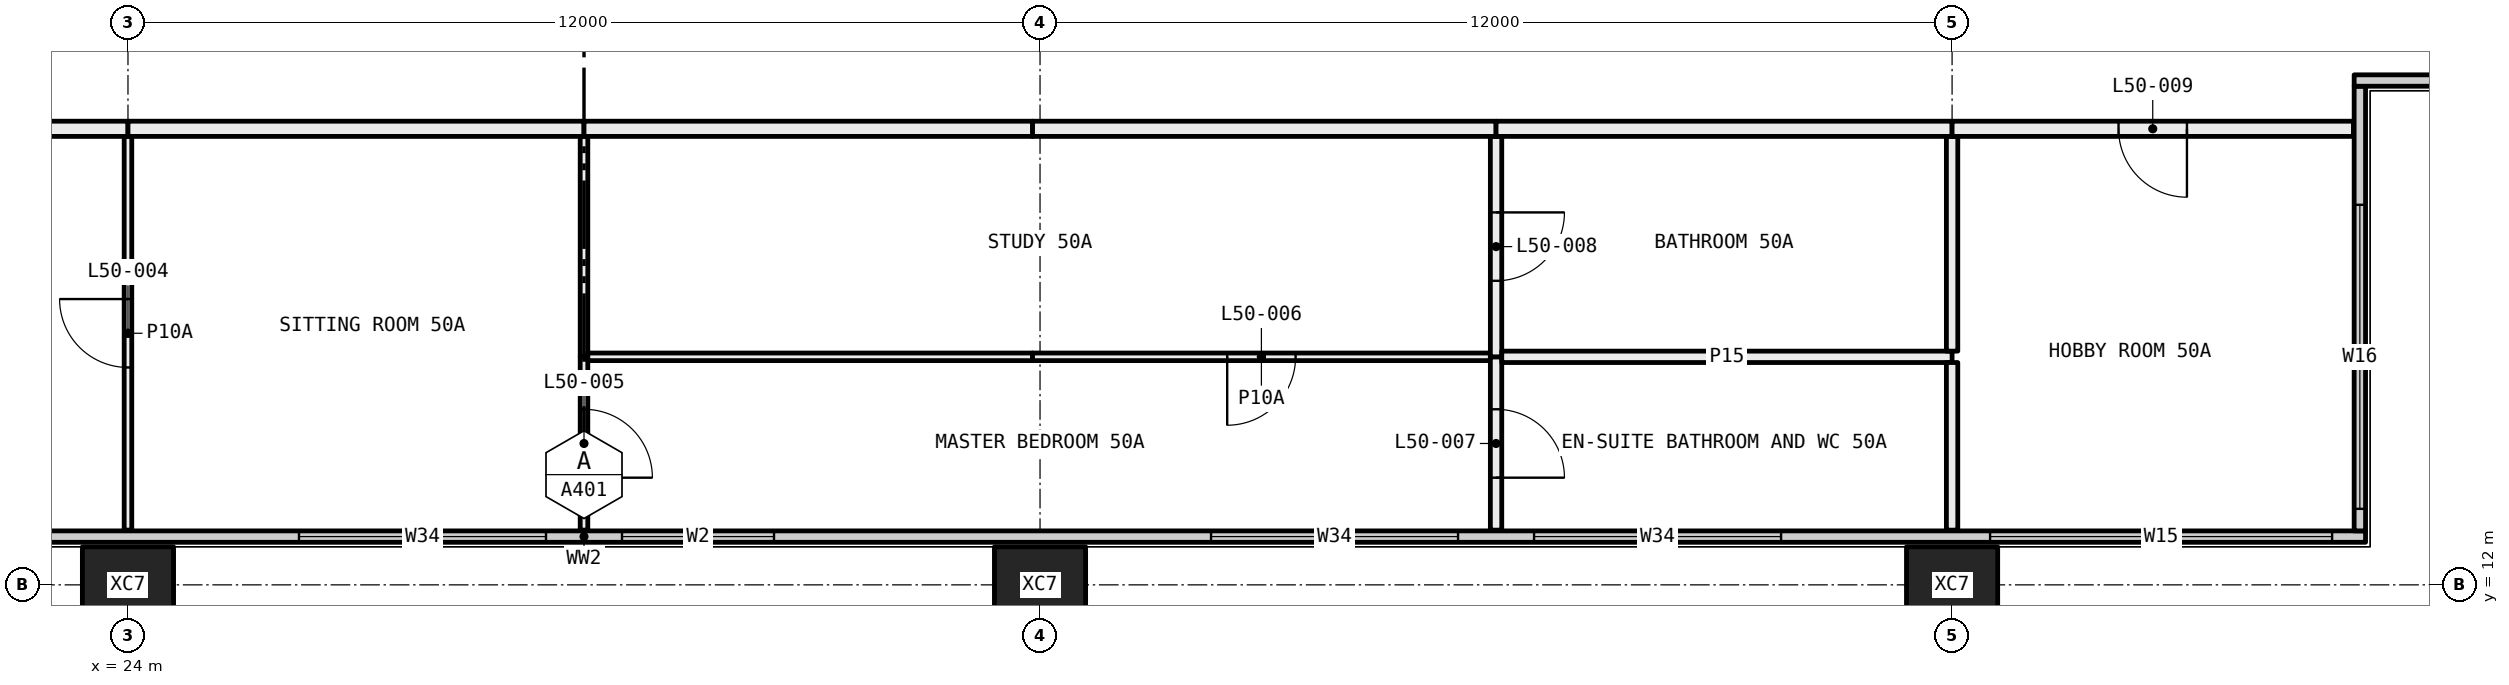
"""IFC4 building model, lengths in metres.
Left out: names, types, materials, properties, quantities, classifications, styles, units other than length and angle.
Written with IfcOpenShell. Run it as: python <this file> out.ifc"""

import sys

from ifc_helpers import new_model, si_unit, direction, frame, frame_2d, origin, origin_2d, place, context, subcontext, project, spatial, rectangle, hollow_rectangle, extrude, element, fill, save


model = new_model("IFC4")
c1 = context("Model", 3, precision=1e-05, world=origin(), true_north=direction((0.0, 1.0)))
c2 = subcontext(c1, "Body", "Model", "MODEL_VIEW")
j1 = project(units=[si_unit("LENGTHUNIT", "METRE"), si_unit("PLANEANGLEUNIT", "RADIAN")], contexts=[c1])
p1 = place(None, origin())
s1 = spatial("IfcSite", under=j1, at=p1, CompositionType="ELEMENT")
p2 = place(p1, origin())
s2 = spatial("IfcBuilding", under=s1, at=p2, CompositionType="ELEMENT")
p3 = place(p2, frame((0.0, 0.0, 189.3)))
s3 = spatial("IfcBuildingStorey", under=s2, at=p3, CompositionType="ELEMENT", Elevation=189.3)
for number, where, z_axis, x_axis in (
    (1, (24.0, 12.0, -0.4), (0.0, 0.0, 1.0), (1.0, 0.0, 0.0)),
    (2, (36.0, 12.0, -0.4), (0.0, 0.0, 1.0), (1.0, 0.0, 0.0)),
    (3, (48.0, 12.0, -0.4), (0.0, 0.0, 1.0), (1.0, 0.0, 0.0)),
):
    element("IfcColumn", number, at=place(p3, frame(where, z_axis=z_axis, x_axis=x_axis)), inside=s3, PredefinedType="COLUMN", context=c2, shape_type="SweptSolid", body=[
        extrude(hollow_rectangle(XDim=1.2, YDim=1.0, WallThickness=0.045, at=origin_2d()), origin(), (0.0, 0.0, 1.0), 3.45),
    ])
p4 = place(p3, frame((6.56, 12.635, 0.0), z_axis=(0.0, 0.0, 1.0), x_axis=(1.0, 0.0, 0.0)))
e4 = element("IfcWall", 4, at=p4, inside=s3, PredefinedType="ELEMENTEDWALL", context=c2, shape_type="SweptSolid", body=[
    extrude(rectangle(XDim=46.88, YDim=0.15, at=frame_2d((23.44, 0.0))), origin(), (0.0, 0.0, 1.0), 3.05),
])
p5 = place(p4, frame((0.44, 0.0, 0.45)))
e5 = element("IfcOpeningElement", 5, at=p5, cuts=e4, PredefinedType="OPENING", context=c2, shape_type="SweptSolid", body=[
    extrude(rectangle(XDim=4.5, YDim=2.55, at=frame_2d((2.25, 1.275))), frame((0.0, 0.085, 0.0), z_axis=(0.0, -1.0, 0.0), x_axis=(1.0, 0.0, 0.0)), (0.0, 0.0, 1.0), 0.17),
])
p6 = place(p4, frame((7.69, 0.0, 0.45)))
e6 = element("IfcOpeningElement", 6, at=p6, cuts=e4, PredefinedType="OPENING", context=c2, shape_type="SweptSolid", body=[
    extrude(rectangle(XDim=3.25, YDim=2.55, at=frame_2d((1.625, 1.275))), frame((0.0, 0.085, 0.0), z_axis=(0.0, -1.0, 0.0), x_axis=(1.0, 0.0, 0.0)), (0.0, 0.0, 1.0), 0.17),
])
p7 = place(p4, frame((11.94, 0.0, 0.45)))
e7 = element("IfcOpeningElement", 7, at=p7, cuts=e4, PredefinedType="OPENING", context=c2, shape_type="SweptSolid", body=[
    extrude(rectangle(XDim=3.25, YDim=2.55, at=frame_2d((1.625, 1.275))), frame((0.0, 0.085, 0.0), z_axis=(0.0, -1.0, 0.0), x_axis=(1.0, 0.0, 0.0)), (0.0, 0.0, 1.0), 0.17),
])
p8 = place(p4, frame((19.69, 0.0, 0.45)))
e8 = element("IfcOpeningElement", 8, at=p8, cuts=e4, PredefinedType="OPENING", context=c2, shape_type="SweptSolid", body=[
    extrude(rectangle(XDim=3.25, YDim=2.55, at=frame_2d((1.625, 1.275))), frame((0.0, 0.085, 0.0), z_axis=(0.0, -1.0, 0.0), x_axis=(1.0, 0.0, 0.0)), (0.0, 0.0, 1.0), 0.17),
])
p9 = place(p4, frame((23.94, 0.0, 0.45)))
e9 = element("IfcOpeningElement", 9, at=p9, cuts=e4, PredefinedType="OPENING", context=c2, shape_type="SweptSolid", body=[
    extrude(rectangle(XDim=2.0, YDim=2.55, at=frame_2d((1.0, 1.275))), frame((0.0, 0.085, 0.0), z_axis=(0.0, -1.0, 0.0), x_axis=(1.0, 0.0, 0.0)), (0.0, 0.0, 1.0), 0.17),
])
p10 = place(p4, frame((31.69, 0.0, 0.45)))
e10 = element("IfcOpeningElement", 10, at=p10, cuts=e4, PredefinedType="OPENING", context=c2, shape_type="SweptSolid", body=[
    extrude(rectangle(XDim=3.25, YDim=2.55, at=frame_2d((1.625, 1.275))), frame((0.0, 0.085, 0.0), z_axis=(0.0, -1.0, 0.0), x_axis=(1.0, 0.0, 0.0)), (0.0, 0.0, 1.0), 0.17),
])
p11 = place(p4, frame((35.94, 0.0, 0.45)))
e11 = element("IfcOpeningElement", 11, at=p11, cuts=e4, PredefinedType="OPENING", context=c2, shape_type="SweptSolid", body=[
    extrude(rectangle(XDim=3.25, YDim=2.55, at=frame_2d((1.625, 1.275))), frame((0.0, 0.085, 0.0), z_axis=(0.0, -1.0, 0.0), x_axis=(1.0, 0.0, 0.0)), (0.0, 0.0, 1.0), 0.17),
])
p12 = place(p4, frame((41.94, 0.0, 0.45)))
e12 = element("IfcOpeningElement", 12, at=p12, cuts=e4, PredefinedType="OPENING", context=c2, shape_type="SweptSolid", body=[
    extrude(rectangle(XDim=4.5, YDim=2.55, at=frame_2d((2.25, 1.275))), frame((0.0, 0.085, 0.0), z_axis=(0.0, -1.0, 0.0), x_axis=(1.0, 0.0, 0.0)), (0.0, 0.0, 1.0), 0.17),
])
p13 = place(p3, frame((53.365, 12.71, 0.0), z_axis=(0.0, 0.0, 1.0), x_axis=(0.0, 1.0, 0.0)))
e13 = element("IfcWall", 13, at=p13, inside=s3, PredefinedType="ELEMENTEDWALL", context=c2, shape_type="SweptSolid", body=[
    extrude(rectangle(XDim=5.85, YDim=0.15, at=frame_2d((2.925, 0.0))), origin(), (0.0, 0.0, 1.0), 3.05),
])
p14 = place(p13, frame((0.29, 0.0, 0.45)))
e14 = element("IfcOpeningElement", 14, at=p14, cuts=e13, PredefinedType="OPENING", context=c2, shape_type="SweptSolid", body=[
    extrude(rectangle(XDim=4.0, YDim=2.55, at=frame_2d((2.0, 1.275))), frame((0.0, 0.085, 0.0), z_axis=(0.0, -1.0, 0.0), x_axis=(1.0, 0.0, 0.0)), (0.0, 0.0, 1.0), 0.17),
])
p15 = place(p3, frame((53.29, 18.635, 0.0), z_axis=(0.0, 0.0, 1.0), x_axis=(1.0, 0.0, 0.0)))
e15 = element("IfcWall", 15, at=p15, inside=s3, PredefinedType="ELEMENTEDWALL", context=c2, shape_type="SweptSolid", body=[
    extrude(rectangle(XDim=6.15, YDim=0.15, at=frame_2d((3.075, 0.0))), origin(), (0.0, 0.0, 1.0), 3.05),
])
p16 = place(p15, frame((1.71, 0.0, 0.45)))
e16 = element("IfcOpeningElement", 16, at=p16, cuts=e15, PredefinedType="OPENING", context=c2, shape_type="SweptSolid", body=[
    extrude(rectangle(XDim=4.0, YDim=2.55, at=frame_2d((2.0, 1.275))), frame((0.0, 0.085, 0.0), z_axis=(0.0, -1.0, 0.0), x_axis=(1.0, 0.0, 0.0)), (0.0, 0.0, 1.0), 0.17),
])
p17 = place(p3, frame((24.0, 12.72, 0.0), z_axis=(0.0, 0.0, 1.0), x_axis=(0.0, 1.0, 0.0)))
e17 = element("IfcWall", 17, at=p17, inside=s3, PredefinedType="PARTITIONING", context=c2, shape_type="SweptSolid", body=[
    extrude(rectangle(XDim=5.18, YDim=0.1, at=frame_2d((2.59, 0.0))), origin(), (0.0, 0.0, 1.0), 3.05),
])
p18 = place(p17, frame((2.14, 0.0, 0.0)))
e18 = element("IfcOpeningElement", 18, at=p18, cuts=e17, PredefinedType="OPENING", context=c2, shape_type="SweptSolid", body=[
    extrude(rectangle(XDim=0.9, YDim=2.1, at=frame_2d((0.45, 1.05))), frame((0.0, 0.06, 0.0), z_axis=(0.0, -1.0, 0.0), x_axis=(1.0, 0.0, 0.0)), (0.0, 0.0, 1.0), 0.12),
])
p19 = place(p3, frame((24.0, 18.0, 0.0), z_axis=(0.0, 0.0, 1.0), x_axis=(-1.0, 0.0, 0.0)))
e19 = element("IfcWall", 19, at=p19, inside=s3, PredefinedType="PARTITIONING", context=c2, shape_type="SweptSolid", body=[
    extrude(rectangle(XDim=6.0, YDim=0.2, at=frame_2d((3.0, 0.0))), origin(), (0.0, 0.0, 1.0), 3.05),
])
p20 = place(p3, frame((30.0, 12.72, 0.0), z_axis=(0.0, 0.0, 1.0), x_axis=(0.0, 1.0, 0.0)))
e20 = element("IfcWall", 20, at=p20, inside=s3, PredefinedType="PARTITIONING", context=c2, shape_type="SweptSolid", body=[
    extrude(rectangle(XDim=2.28, YDim=0.1, at=frame_2d((1.14, 0.0))), origin(), (0.0, 0.0, 1.0), 3.05),
])
p21 = place(p20, frame((0.69, 0.0, 0.0)))
e21 = element("IfcOpeningElement", 21, at=p21, cuts=e20, PredefinedType="OPENING", context=c2, shape_type="SweptSolid", body=[
    extrude(rectangle(XDim=0.9, YDim=2.1, at=frame_2d((0.45, 1.05))), frame((0.0, 0.06, 0.0), z_axis=(0.0, -1.0, 0.0), x_axis=(1.0, 0.0, 0.0)), (0.0, 0.0, 1.0), 0.12),
])
p22 = place(p3, frame((30.0, 15.0, 0.0), z_axis=(0.0, 0.0, 1.0), x_axis=(0.0, 1.0, 0.0)))
e22 = element("IfcWall", 22, at=p22, inside=s3, PredefinedType="PARTITIONING", context=c2, shape_type="SweptSolid", body=[
    extrude(rectangle(XDim=2.9, YDim=0.1, at=frame_2d((1.45, 0.0))), origin(), (0.0, 0.0, 1.0), 3.05),
])
p23 = place(p3, frame((30.0, 18.0, 0.0), z_axis=(0.0, 0.0, 1.0), x_axis=(-1.0, 0.0, 0.0)))
e23 = element("IfcWall", 23, at=p23, inside=s3, PredefinedType="PARTITIONING", context=c2, shape_type="SweptSolid", body=[
    extrude(rectangle(XDim=6.0, YDim=0.2, at=frame_2d((3.0, 0.0))), origin(), (0.0, 0.0, 1.0), 3.05),
])
p24 = place(p3, frame((41.925, 15.0, 0.0), z_axis=(0.0, 0.0, 1.0), x_axis=(-1.0, 0.0, 0.0)))
e24 = element("IfcWall", 24, at=p24, inside=s3, PredefinedType="PARTITIONING", context=c2, shape_type="SweptSolid", body=[
    extrude(rectangle(XDim=6.025, YDim=0.1, at=frame_2d((3.013, 0.0))), origin(), (0.0, 0.0, 1.0), 2.45),
])
p25 = place(p24, frame((2.562, 0.0, 0.0)))
e25 = element("IfcOpeningElement", 25, at=p25, cuts=e24, PredefinedType="OPENING", context=c2, shape_type="SweptSolid", body=[
    extrude(rectangle(XDim=0.9, YDim=2.1, at=frame_2d((0.45, 1.05))), frame((0.0, 0.06, 0.0), z_axis=(0.0, -1.0, 0.0), x_axis=(1.0, 0.0, 0.0)), (0.0, 0.0, 1.0), 0.12),
])
p26 = place(p3, frame((35.9, 15.0, 0.0), z_axis=(0.0, 0.0, 1.0), x_axis=(-1.0, 0.0, 0.0)))
e26 = element("IfcWall", 26, at=p26, inside=s3, PredefinedType="PARTITIONING", context=c2, shape_type="SweptSolid", body=[
    extrude(rectangle(XDim=5.85, YDim=0.1, at=frame_2d((2.925, 0.0))), origin(), (0.0, 0.0, 1.0), 3.05),
])
p27 = place(p3, frame((42.0, 12.72, 0.0), z_axis=(0.0, 0.0, 1.0), x_axis=(0.0, 1.0, 0.0)))
e27 = element("IfcWall", 27, at=p27, inside=s3, PredefinedType="PARTITIONING", context=c2, shape_type="SweptSolid", body=[
    extrude(rectangle(XDim=2.28, YDim=0.15, at=frame_2d((1.14, 0.0))), origin(), (0.0, 0.0, 1.0), 3.05),
])
p28 = place(p27, frame((0.69, 0.0, 0.0)))
e28 = element("IfcOpeningElement", 28, at=p28, cuts=e27, PredefinedType="OPENING", context=c2, shape_type="SweptSolid", body=[
    extrude(rectangle(XDim=0.9, YDim=2.1, at=frame_2d((0.45, 1.05))), frame((0.0, 0.085, 0.0), z_axis=(0.0, -1.0, 0.0), x_axis=(1.0, 0.0, 0.0)), (0.0, 0.0, 1.0), 0.17),
])
p29 = place(p3, frame((42.0, 15.0, 0.0), z_axis=(0.0, 0.0, 1.0), x_axis=(0.0, 1.0, 0.0)))
e29 = element("IfcWall", 29, at=p29, inside=s3, PredefinedType="PARTITIONING", context=c2, shape_type="SweptSolid", body=[
    extrude(rectangle(XDim=2.9, YDim=0.15, at=frame_2d((1.45, 0.0))), origin(), (0.0, 0.0, 1.0), 3.05),
])
p30 = place(p29, frame((1.0, 0.0, 0.0)))
e30 = element("IfcOpeningElement", 30, at=p30, cuts=e29, PredefinedType="OPENING", context=c2, shape_type="SweptSolid", body=[
    extrude(rectangle(XDim=0.9, YDim=2.1, at=frame_2d((0.45, 1.05))), frame((0.0, 0.085, 0.0), z_axis=(0.0, -1.0, 0.0), x_axis=(1.0, 0.0, 0.0)), (0.0, 0.0, 1.0), 0.17),
])
p31 = place(p3, frame((42.0, 18.0, 0.0), z_axis=(0.0, 0.0, 1.0), x_axis=(-1.0, 0.0, 0.0)))
e31 = element("IfcWall", 31, at=p31, inside=s3, PredefinedType="PARTITIONING", context=c2, shape_type="SweptSolid", body=[
    extrude(rectangle(XDim=6.1, YDim=0.2, at=frame_2d((3.05, 0.0))), origin(), (0.0, 0.0, 1.0), 2.45),
])
p32 = place(p3, frame((35.9, 18.0, 0.0), z_axis=(0.0, 0.0, 1.0), x_axis=(-1.0, 0.0, 0.0)))
e32 = element("IfcWall", 32, at=p32, inside=s3, PredefinedType="PARTITIONING", context=c2, shape_type="SweptSolid", body=[
    extrude(rectangle(XDim=5.9, YDim=0.2, at=frame_2d((2.95, 0.0))), origin(), (0.0, 0.0, 1.0), 3.05),
])
p33 = place(p3, frame((48.0, 15.0, 0.0), z_axis=(0.0, 0.0, 1.0), x_axis=(-1.0, 0.0, 0.0)))
e33 = element("IfcWall", 33, at=p33, inside=s3, PredefinedType="PARTITIONING", context=c2, shape_type="SweptSolid", body=[
    extrude(rectangle(XDim=5.925, YDim=0.15, at=frame_2d((2.962, 0.0))), origin(), (0.0, 0.0, 1.0), 3.05),
])
p34 = place(p3, frame((48.0, 12.72, 0.0), z_axis=(0.0, 0.0, 1.0), x_axis=(0.0, 1.0, 0.0)))
e34 = element("IfcWall", 34, at=p34, inside=s3, PredefinedType="PARTITIONING", context=c2, shape_type="SweptSolid", body=[
    extrude(rectangle(XDim=2.205, YDim=0.15, at=frame_2d((1.103, 0.0))), origin(), (0.0, 0.0, 1.0), 3.05),
])
p35 = place(p3, frame((48.0, 15.075, 0.0), z_axis=(0.0, 0.0, 1.0), x_axis=(0.0, 1.0, 0.0)))
e35 = element("IfcWall", 35, at=p35, inside=s3, PredefinedType="PARTITIONING", context=c2, shape_type="SweptSolid", body=[
    extrude(rectangle(XDim=2.825, YDim=0.15, at=frame_2d((1.413, 0.0))), origin(), (0.0, 0.0, 1.0), 3.05),
])
p36 = place(p3, frame((48.0, 18.0, 0.0), z_axis=(0.0, 0.0, 1.0), x_axis=(-1.0, 0.0, 0.0)))
e36 = element("IfcWall", 36, at=p36, inside=s3, PredefinedType="PARTITIONING", context=c2, shape_type="SweptSolid", body=[
    extrude(rectangle(XDim=6.0, YDim=0.2, at=frame_2d((3.0, 0.0))), origin(), (0.0, 0.0, 1.0), 3.05),
])
p37 = place(p3, frame((53.28, 18.0, 0.0), z_axis=(0.0, 0.0, 1.0), x_axis=(-1.0, 0.0, 0.0)))
e37 = element("IfcWall", 37, at=p37, inside=s3, PredefinedType="PARTITIONING", context=c2, shape_type="SweptSolid", body=[
    extrude(rectangle(XDim=5.28, YDim=0.2, at=frame_2d((2.64, 0.0))), origin(), (0.0, 0.0, 1.0), 3.05),
])
p38 = place(p37, frame((2.19, 0.0, 0.0)))
e38 = element("IfcOpeningElement", 38, at=p38, cuts=e37, PredefinedType="OPENING", context=c2, shape_type="SweptSolid", body=[
    extrude(rectangle(XDim=0.9, YDim=2.1, at=frame_2d((0.45, 1.05))), frame((0.0, 0.11, 0.0), z_axis=(0.0, -1.0, 0.0), x_axis=(1.0, 0.0, 0.0)), (0.0, 0.0, 1.0), 0.22),
])
p39 = place(p8, origin())
e39 = element("IfcWindow", 39, at=p39, inside=s3, PartitioningType="SINGLE_PANEL", PredefinedType="WINDOW", context=c2, shape_type="SweptSolid", body=[
    extrude(rectangle(XDim=3.25, YDim=2.55, at=frame_2d((1.625, 1.275))), frame((0.0, 0.03, 0.0), z_axis=(0.0, -1.0, 0.0), x_axis=(1.0, 0.0, 0.0)), (0.0, 0.0, 1.0), 0.06),
])
fill(e8, e39)
p40 = place(p9, origin())
e40 = element("IfcWindow", 40, at=p40, inside=s3, PartitioningType="SINGLE_PANEL", PredefinedType="WINDOW", context=c2, shape_type="SweptSolid", body=[
    extrude(rectangle(XDim=2.0, YDim=2.55, at=frame_2d((1.0, 1.275))), frame((0.0, 0.03, 0.0), z_axis=(0.0, -1.0, 0.0), x_axis=(1.0, 0.0, 0.0)), (0.0, 0.0, 1.0), 0.06),
])
fill(e9, e40)
p41 = place(p10, origin())
e41 = element("IfcWindow", 41, at=p41, inside=s3, PartitioningType="SINGLE_PANEL", PredefinedType="WINDOW", context=c2, shape_type="SweptSolid", body=[
    extrude(rectangle(XDim=3.25, YDim=2.55, at=frame_2d((1.625, 1.275))), frame((0.0, 0.03, 0.0), z_axis=(0.0, -1.0, 0.0), x_axis=(1.0, 0.0, 0.0)), (0.0, 0.0, 1.0), 0.06),
])
fill(e10, e41)
p42 = place(p11, origin())
e42 = element("IfcWindow", 42, at=p42, inside=s3, PartitioningType="SINGLE_PANEL", PredefinedType="WINDOW", context=c2, shape_type="SweptSolid", body=[
    extrude(rectangle(XDim=3.25, YDim=2.55, at=frame_2d((1.625, 1.275))), frame((0.0, 0.03, 0.0), z_axis=(0.0, -1.0, 0.0), x_axis=(1.0, 0.0, 0.0)), (0.0, 0.0, 1.0), 0.06),
])
fill(e11, e42)
p43 = place(p12, origin())
e43 = element("IfcWindow", 43, at=p43, inside=s3, PartitioningType="SINGLE_PANEL", PredefinedType="WINDOW", context=c2, shape_type="SweptSolid", body=[
    extrude(rectangle(XDim=4.5, YDim=2.55, at=frame_2d((2.25, 1.275))), frame((0.0, 0.03, 0.0), z_axis=(0.0, -1.0, 0.0), x_axis=(1.0, 0.0, 0.0)), (0.0, 0.0, 1.0), 0.06),
])
fill(e12, e43)
p44 = place(p14, origin())
e44 = element("IfcWindow", 44, at=p44, inside=s3, PartitioningType="SINGLE_PANEL", PredefinedType="WINDOW", context=c2, shape_type="SweptSolid", body=[
    extrude(rectangle(XDim=4.0, YDim=2.55, at=frame_2d((2.0, 1.275))), frame((0.0, 0.03, 0.0), z_axis=(0.0, -1.0, 0.0), x_axis=(1.0, 0.0, 0.0)), (0.0, 0.0, 1.0), 0.06),
])
fill(e14, e44)
p45 = place(p18, origin())
e45 = element("IfcDoor", 45, at=p45, inside=s3, OperationType="SINGLE_SWING_LEFT", PredefinedType="DOOR", context=c2, shape_type="SweptSolid", body=[
    extrude(rectangle(XDim=0.9, YDim=2.1, at=frame_2d((0.45, 1.05))), frame((0.0, 0.025, 0.0), z_axis=(0.0, -1.0, 0.0), x_axis=(1.0, 0.0, 0.0)), (0.0, 0.0, 1.0), 0.05),
])
fill(e18, e45)
p46 = place(p21, frame((0.9, 0.0, 0.0), x_axis=(-1.0, 0.0, 0.0)))
e46 = element("IfcDoor", 46, at=p46, inside=s3, OperationType="SINGLE_SWING_LEFT", PredefinedType="DOOR", context=c2, shape_type="SweptSolid", body=[
    extrude(rectangle(XDim=0.9, YDim=2.1, at=frame_2d((0.45, 1.05))), frame((0.0, 0.025, 0.0), z_axis=(0.0, -1.0, 0.0), x_axis=(1.0, 0.0, 0.0)), (0.0, 0.0, 1.0), 0.05),
])
fill(e21, e46)
p47 = place(p25, origin())
e47 = element("IfcDoor", 47, at=p47, inside=s3, OperationType="SINGLE_SWING_LEFT", PredefinedType="DOOR", context=c2, shape_type="SweptSolid", body=[
    extrude(rectangle(XDim=0.9, YDim=2.1, at=frame_2d((0.45, 1.05))), frame((0.0, 0.025, 0.0), z_axis=(0.0, -1.0, 0.0), x_axis=(1.0, 0.0, 0.0)), (0.0, 0.0, 1.0), 0.05),
])
fill(e25, e47)
p48 = place(p28, frame((0.9, 0.0, 0.0), x_axis=(-1.0, 0.0, 0.0)))
e48 = element("IfcDoor", 48, at=p48, inside=s3, OperationType="SINGLE_SWING_LEFT", PredefinedType="DOOR", context=c2, shape_type="SweptSolid", body=[
    extrude(rectangle(XDim=0.9, YDim=2.1, at=frame_2d((0.45, 1.05))), frame((0.0, 0.025, 0.0), z_axis=(0.0, -1.0, 0.0), x_axis=(1.0, 0.0, 0.0)), (0.0, 0.0, 1.0), 0.05),
])
fill(e28, e48)
p49 = place(p30, frame((0.9, 0.0, 0.0), x_axis=(-1.0, 0.0, 0.0)))
e49 = element("IfcDoor", 49, at=p49, inside=s3, OperationType="SINGLE_SWING_RIGHT", PredefinedType="DOOR", context=c2, shape_type="SweptSolid", body=[
    extrude(rectangle(XDim=0.9, YDim=2.1, at=frame_2d((0.45, 1.05))), frame((0.0, 0.025, 0.0), z_axis=(0.0, -1.0, 0.0), x_axis=(1.0, 0.0, 0.0)), (0.0, 0.0, 1.0), 0.05),
])
fill(e30, e49)
p50 = place(p38, origin())
e50 = element("IfcDoor", 50, at=p50, inside=s3, OperationType="SINGLE_SWING_RIGHT", PredefinedType="DOOR", context=c2, shape_type="SweptSolid", body=[
    extrude(rectangle(XDim=0.9, YDim=2.1, at=frame_2d((0.45, 1.05))), frame((0.0, 0.025, 0.0), z_axis=(0.0, -1.0, 0.0), x_axis=(1.0, 0.0, 0.0)), (0.0, 0.0, 1.0), 0.05),
])
fill(e38, e50)
save(model, sys.argv[1])
